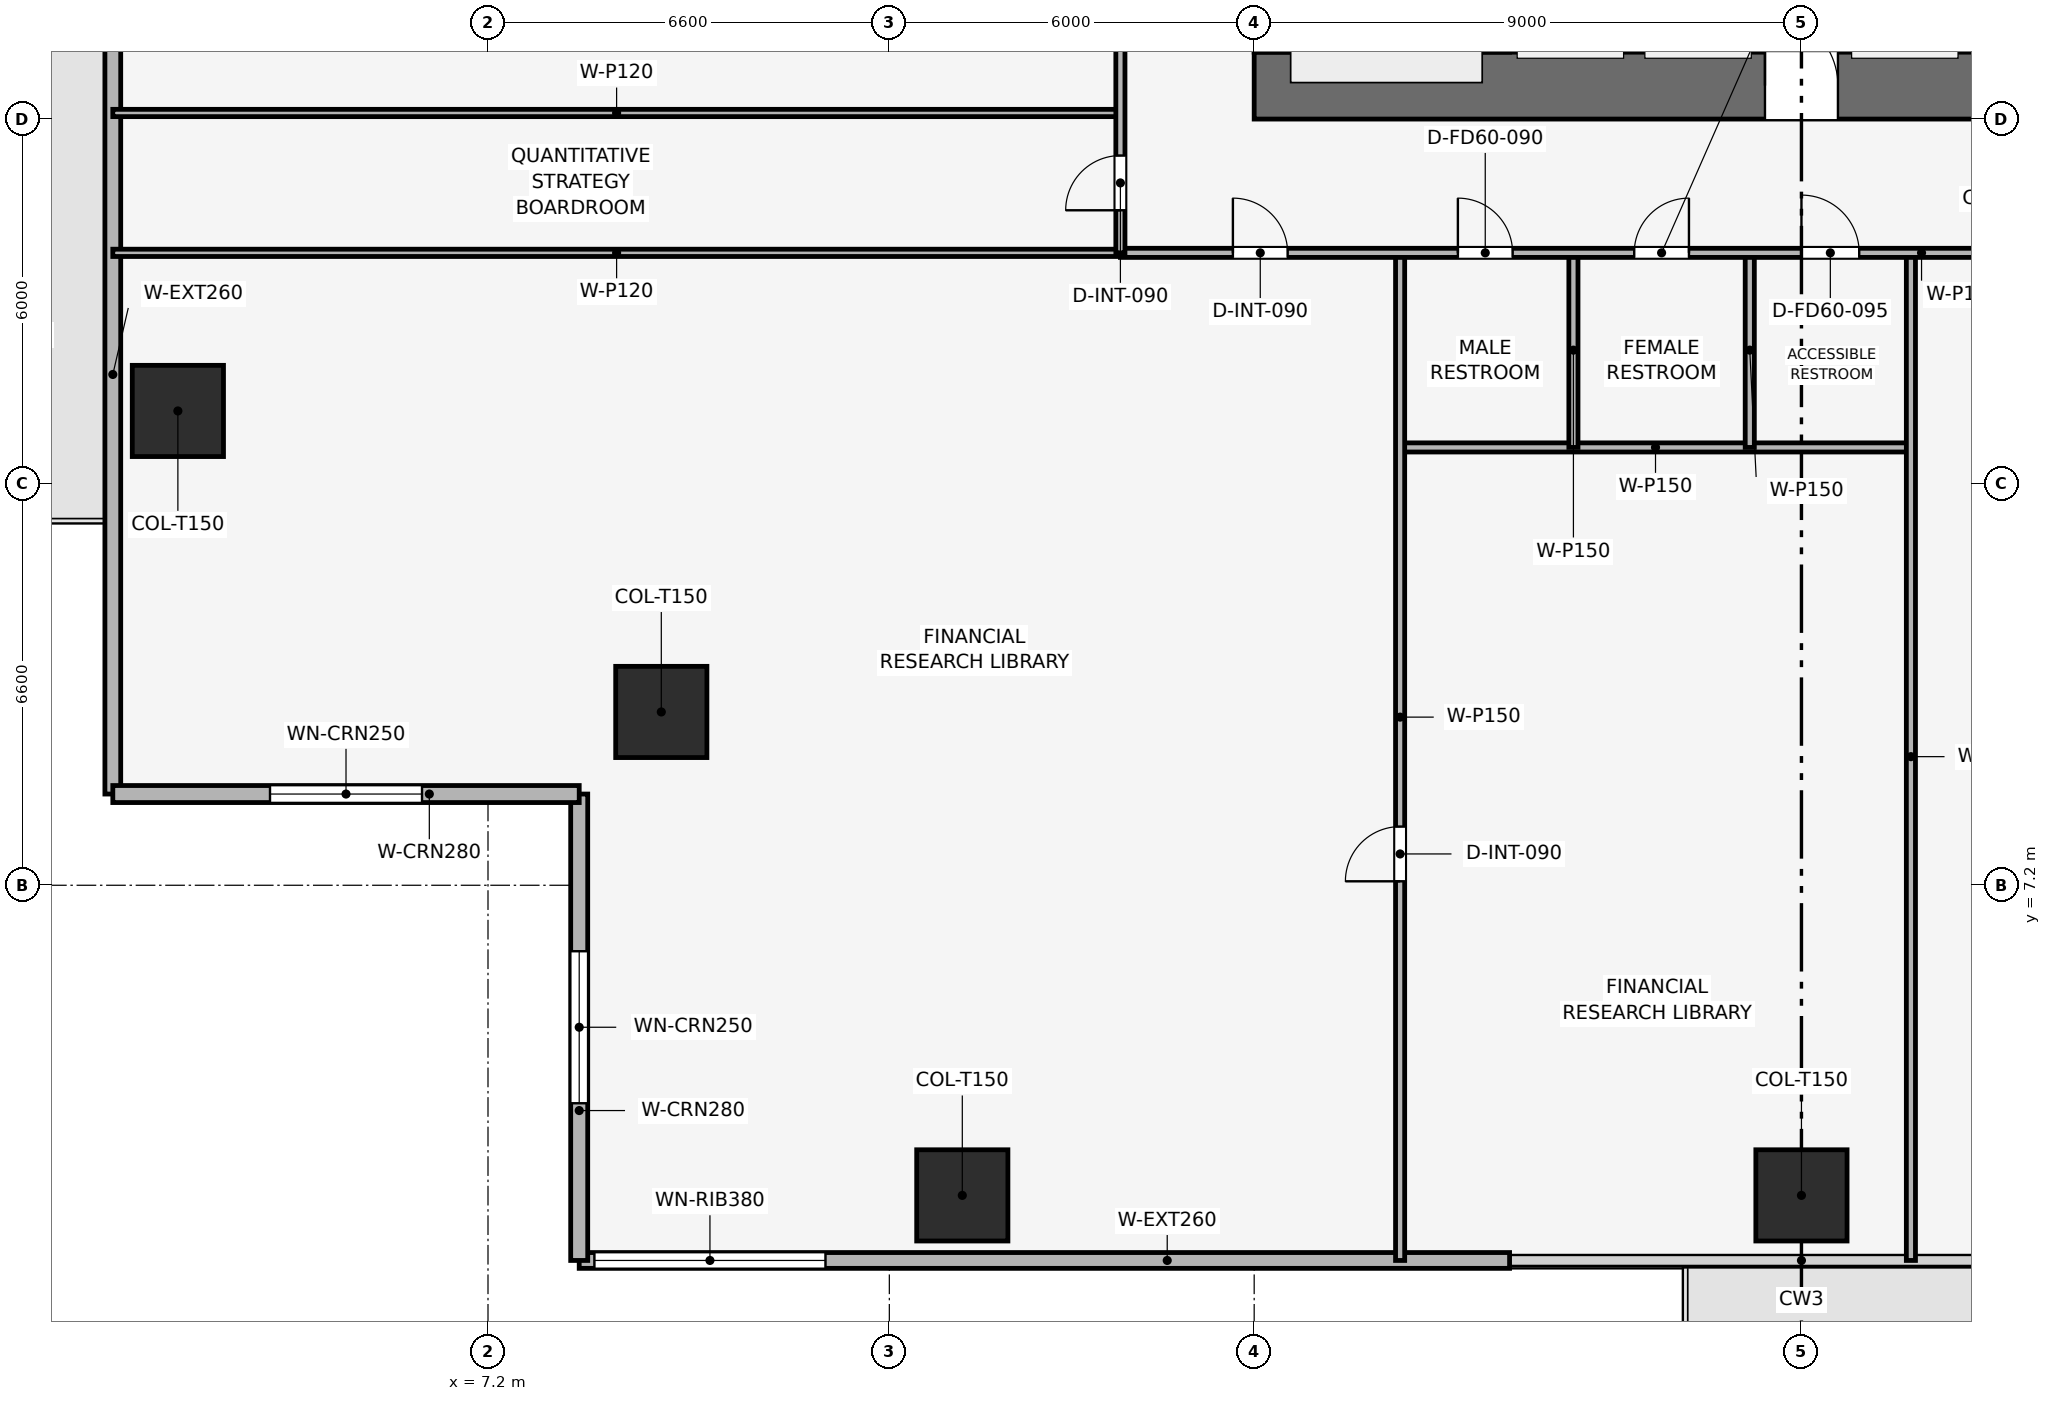
"""IFC4 building model, lengths in metres.
Left out: names, types, materials, properties, quantities, classifications, styles, units other than length and angle.
Written with IfcOpenShell. Run it as: python <this file> out.ifc"""

import sys

from ifc_helpers import new_model, si_unit, direction, frame, frame_2d, origin, origin_2d, place, context, subcontext, project, spatial, rectangle, extrude, element, fill, save


model = new_model("IFC4")
c1 = context("Model", 3, precision=1e-05, world=origin(), true_north=direction((0.0, 1.0)))
c2 = subcontext(c1, "Body", "Model", "MODEL_VIEW")
j1 = project(units=[si_unit("LENGTHUNIT", "METRE"), si_unit("PLANEANGLEUNIT", "RADIAN")], contexts=[c1])
p1 = place(None, origin())
s1 = spatial("IfcSite", under=j1, at=p1, CompositionType="ELEMENT")
p2 = place(p1, origin())
s2 = spatial("IfcBuilding", under=s1, at=p2, CompositionType="ELEMENT")
p3 = place(p2, frame((0.0, 0.0, 37.8)))
s3 = spatial("IfcBuildingStorey", under=s2, at=p3, CompositionType="ELEMENT", Elevation=37.8)
p4 = place(p3, frame((19.8, 20.35, 0.0), z_axis=(0.0, 0.0, 1.0), x_axis=(1.0, 0.0, 0.0)))
e1 = element("IfcWall", 1, at=p4, inside=s3, PredefinedType="SHEAR", context=c2, shape_type="SweptSolid", body=[
    extrude(rectangle(XDim=18.0, YDim=1.1, at=frame_2d((9.0, 0.0))), origin(), (0.0, 0.0, 1.0), 3.9),
])
p5 = place(p4, frame((8.4, 0.0, 0.0)))
e2 = element("IfcOpeningElement", 2, at=p5, cuts=e1, PredefinedType="OPENING", context=c2, shape_type="SweptSolid", body=[
    extrude(rectangle(XDim=1.2, YDim=2.2, at=frame_2d((0.6, 1.1))), frame((0.0, 0.56, 0.0), z_axis=(0.0, -1.0, 0.0), x_axis=(1.0, 0.0, 0.0)), (0.0, 0.0, 1.0), 1.12),
])
p6 = place(p3, frame((20.35, 20.9, 0.0), z_axis=(0.0, 0.0, 1.0), x_axis=(0.0, 1.0, 0.0)))
e3 = element("IfcWall", 3, at=p6, inside=s3, PredefinedType="SHEAR", context=c2, shape_type="SweptSolid", body=[
    extrude(rectangle(XDim=15.8, YDim=1.1, at=frame_2d((7.9, 0.0))), origin(), (0.0, 0.0, 1.0), 3.9),
])
p7 = place(p6, frame((9.9, 0.0, 0.0)))
e4 = element("IfcOpeningElement", 4, at=p7, cuts=e3, PredefinedType="OPENING", context=c2, shape_type="SweptSolid", body=[
    extrude(rectangle(XDim=1.1, YDim=2.15, at=frame_2d((0.55, 1.075))), frame((0.0, 0.56, 0.0), z_axis=(0.0, -1.0, 0.0), x_axis=(1.0, 0.0, 0.0)), (0.0, 0.0, 1.0), 1.12),
])
p8 = place(p3, frame((23.775, 20.9, 0.0), z_axis=(0.0, 0.0, 1.0), x_axis=(0.0, 1.0, 0.0)))
e5 = element("IfcWall", 5, at=p8, inside=s3, PredefinedType="SHEAR", context=c2, shape_type="SweptSolid", body=[
    extrude(rectangle(XDim=15.8, YDim=0.45, at=frame_2d((7.9, 0.0))), origin(), (0.0, 0.0, 1.0), 3.9),
])
for number, where, z_axis, x_axis in (
    (6, (15.0, 2.1, 0.003), (0.0, 0.0, 1.0), (1.0, 0.0, 0.0)),
    (7, (28.8, 2.1, 0.003), (0.0, 0.0, 1.0), (1.0, 0.0, 0.0)),
    (8, (2.1, 15.0, 0.003), (0.0, 0.0, 1.0), (1.0, 0.0, 0.0)),
    (9, (10.05, 10.05, 0.003), (0.0, 0.0, 1.0), (1.0, 0.0, 0.0)),
):
    element("IfcColumn", number, at=place(p3, frame(where, z_axis=z_axis, x_axis=x_axis)), inside=s3, PredefinedType="COLUMN", context=c2, shape_type="SweptSolid", body=[
        extrude(rectangle(XDim=1.5, YDim=1.5, at=origin_2d()), origin(), (0.0, 0.0, 1.0), 3.644),
    ])
p9 = place(p3, frame((24.0, 1.03, 0.0), z_axis=(0.0, 0.0, 1.0), x_axis=(-1.0, 0.0, 0.0)))
e10 = element("IfcWall", 10, at=p9, inside=s3, PredefinedType="SOLIDWALL", context=c2, shape_type="SweptSolid", body=[
    extrude(rectangle(XDim=15.3, YDim=0.26, at=frame_2d((7.65, 0.0))), origin(), (0.0, 0.0, 1.0), 3.65),
])
p10 = place(p9, frame((11.25, 0.0, 0.9)))
e11 = element("IfcOpeningElement", 11, at=p10, cuts=e10, PredefinedType="OPENING", context=c2, shape_type="SweptSolid", body=[
    extrude(rectangle(XDim=3.8, YDim=1.9, at=frame_2d((1.9, 0.95))), frame((0.0, 0.14, 0.0), z_axis=(0.0, -1.0, 0.0), x_axis=(1.0, 0.0, 0.0)), (0.0, 0.0, 1.0), 0.28),
])
p11 = place(p3, frame((1.03, 8.7, 0.0), z_axis=(0.0, 0.0, 1.0), x_axis=(0.0, 1.0, 0.0)))
e12 = element("IfcWall", 12, at=p11, inside=s3, PredefinedType="SOLIDWALL", context=c2, shape_type="SweptSolid", body=[
    extrude(rectangle(XDim=15.3, YDim=0.26, at=frame_2d((7.65, 0.0))), origin(), (0.0, 0.0, 1.0), 3.65),
])
p12 = place(p11, frame((13.95, 0.0, 0.0)))
e13 = element("IfcOpeningElement", 13, at=p12, cuts=e12, PredefinedType="OPENING", context=c2, shape_type="SweptSolid", body=[
    extrude(rectangle(XDim=1.1, YDim=2.2, at=frame_2d((0.55, 1.1))), frame((0.0, 0.14, 0.0), z_axis=(0.0, -1.0, 0.0), x_axis=(1.0, 0.0, 0.0)), (0.0, 0.0, 1.0), 0.28),
])
p13 = place(p3, frame((8.7, 1.03, 0.0), z_axis=(0.0, 0.0, 1.0), x_axis=(0.0, 1.0, 0.0)))
e14 = element("IfcWall", 14, at=p13, inside=s3, PredefinedType="SOLIDWALL", context=c2, shape_type="SweptSolid", body=[
    extrude(rectangle(XDim=7.67, YDim=0.28, at=frame_2d((3.835, 0.0))), origin(), (0.0, 0.0, 1.0), 3.65),
])
p14 = place(p13, frame((2.585, 0.0, 0.9)))
e15 = element("IfcOpeningElement", 15, at=p14, cuts=e14, PredefinedType="OPENING", context=c2, shape_type="SweptSolid", body=[
    extrude(rectangle(XDim=2.5, YDim=1.9, at=frame_2d((1.25, 0.95))), frame((0.0, 0.15, 0.0), z_axis=(0.0, -1.0, 0.0), x_axis=(1.0, 0.0, 0.0)), (0.0, 0.0, 1.0), 0.3),
])
p15 = place(p3, frame((8.7, 8.7, 0.0), z_axis=(0.0, 0.0, 1.0), x_axis=(-1.0, 0.0, 0.0)))
e16 = element("IfcWall", 16, at=p15, inside=s3, PredefinedType="SOLIDWALL", context=c2, shape_type="SweptSolid", body=[
    extrude(rectangle(XDim=7.67, YDim=0.28, at=frame_2d((3.835, 0.0))), origin(), (0.0, 0.0, 1.0), 3.65),
])
p16 = place(p15, frame((2.585, 0.0, 0.9)))
e17 = element("IfcOpeningElement", 17, at=p16, cuts=e16, PredefinedType="OPENING", context=c2, shape_type="SweptSolid", body=[
    extrude(rectangle(XDim=2.5, YDim=1.9, at=frame_2d((1.25, 0.95))), frame((0.0, 0.15, 0.0), z_axis=(0.0, -1.0, 0.0), x_axis=(1.0, 0.0, 0.0)), (0.0, 0.0, 1.0), 0.3),
])
p17 = place(p3, frame((22.2, 14.4, 0.0), z_axis=(0.0, 0.0, 1.0), x_axis=(1.0, 0.0, 0.0)))
e18 = element("IfcWall", 18, at=p17, inside=s3, PredefinedType="PARTITIONING", context=c2, shape_type="SweptSolid", body=[
    extrude(rectangle(XDim=8.4, YDim=0.15, at=frame_2d((4.2, 0.0))), origin(), (0.0, 0.0, 1.0), 3.085),
])
p18 = place(p3, frame((22.2, 1.03, 0.0), z_axis=(0.0, 0.0, 1.0), x_axis=(0.0, 1.0, 0.0)))
e19 = element("IfcWall", 19, at=p18, inside=s3, PredefinedType="PARTITIONING", context=c2, shape_type="SweptSolid", body=[
    extrude(rectangle(XDim=16.57, YDim=0.15, at=frame_2d((8.285, 0.0))), origin(), (0.0, 0.0, 1.0), 2.935),
])
p19 = place(p18, frame((6.235, 0.0, 0.0)))
e20 = element("IfcOpeningElement", 20, at=p19, cuts=e19, PredefinedType="OPENING", context=c2, shape_type="SweptSolid", body=[
    extrude(rectangle(XDim=0.9, YDim=2.1, at=frame_2d((0.45, 1.05))), frame((0.0, 0.085, 0.0), z_axis=(0.0, -1.0, 0.0), x_axis=(1.0, 0.0, 0.0)), (0.0, 0.0, 1.0), 0.17),
])
p20 = place(p3, frame((30.6, 1.03, 0.0), z_axis=(0.0, 0.0, 1.0), x_axis=(0.0, 1.0, 0.0)))
e21 = element("IfcWall", 21, at=p20, inside=s3, PredefinedType="PARTITIONING", context=c2, shape_type="SweptSolid", body=[
    extrude(rectangle(XDim=16.57, YDim=0.15, at=frame_2d((8.285, 0.0))), origin(), (0.0, 0.0, 1.0), 2.935),
])
for number, where, z_axis, x_axis in (
    (22, (25.05, 14.4, 0.0), (0.0, 0.0, 1.0), (0.0, 1.0, 0.0)),
    (23, (27.95, 14.4, 0.0), (0.0, 0.0, 1.0), (0.0, 1.0, 0.0)),
):
    element("IfcWall", number, at=place(p3, frame(where, z_axis=z_axis, x_axis=x_axis)), inside=s3, PredefinedType="PARTITIONING", context=c2, shape_type="SweptSolid", body=[
        extrude(rectangle(XDim=3.2, YDim=0.15, at=frame_2d((1.6, 0.0))), origin(), (0.0, 0.0, 1.0), 3.65),
    ])
for number, where, z_axis, x_axis in (
    (24, (1.03, 17.6, 0.0), (0.0, 0.0, 1.0), (1.0, 0.0, 0.0)),
    (25, (1.03, 19.9, 0.0), (0.0, 0.0, 1.0), (1.0, 0.0, 0.0)),
):
    element("IfcWall", number, at=place(p3, frame(where, z_axis=z_axis, x_axis=x_axis)), inside=s3, PredefinedType="PARTITIONING", context=c2, shape_type="SweptSolid", body=[
        extrude(rectangle(XDim=16.57, YDim=0.12, at=frame_2d((8.285, 0.0))), origin(), (0.0, 0.0, 1.0), 2.935),
    ])
p21 = place(p3, frame((17.6, 17.6, 0.0), z_axis=(0.0, 0.0, 1.0), x_axis=(1.0, 0.0, 0.0)))
e26 = element("IfcWall", 26, at=p21, inside=s3, PredefinedType="PARTITIONING", context=c2, shape_type="SweptSolid", body=[
    extrude(rectangle(XDim=22.4, YDim=0.15, at=frame_2d((11.2, 0.0))), origin(), (0.0, 0.0, 1.0), 3.085),
])
p22 = place(p21, frame((1.85, 0.0, 0.0)))
e27 = element("IfcOpeningElement", 27, at=p22, cuts=e26, PredefinedType="OPENING", context=c2, shape_type="SweptSolid", body=[
    extrude(rectangle(XDim=0.9, YDim=2.1, at=frame_2d((0.45, 1.05))), frame((0.0, 0.085, 0.0), z_axis=(0.0, -1.0, 0.0), x_axis=(1.0, 0.0, 0.0)), (0.0, 0.0, 1.0), 0.17),
])
p23 = place(p21, frame((5.55, 0.0, 0.0)))
e28 = element("IfcOpeningElement", 28, at=p23, cuts=e26, PredefinedType="OPENING", context=c2, shape_type="SweptSolid", body=[
    extrude(rectangle(XDim=0.9, YDim=2.1, at=frame_2d((0.45, 1.05))), frame((0.0, 0.085, 0.0), z_axis=(0.0, -1.0, 0.0), x_axis=(1.0, 0.0, 0.0)), (0.0, 0.0, 1.0), 0.17),
])
p24 = place(p21, frame((8.45, 0.0, 0.0)))
e29 = element("IfcOpeningElement", 29, at=p24, cuts=e26, PredefinedType="OPENING", context=c2, shape_type="SweptSolid", body=[
    extrude(rectangle(XDim=0.9, YDim=2.1, at=frame_2d((0.45, 1.05))), frame((0.0, 0.085, 0.0), z_axis=(0.0, -1.0, 0.0), x_axis=(1.0, 0.0, 0.0)), (0.0, 0.0, 1.0), 0.17),
])
p25 = place(p21, frame((11.2, 0.0, 0.0)))
e30 = element("IfcOpeningElement", 30, at=p25, cuts=e26, PredefinedType="OPENING", context=c2, shape_type="SweptSolid", body=[
    extrude(rectangle(XDim=0.95, YDim=2.1, at=frame_2d((0.475, 1.05))), frame((0.0, 0.085, 0.0), z_axis=(0.0, -1.0, 0.0), x_axis=(1.0, 0.0, 0.0)), (0.0, 0.0, 1.0), 0.17),
])
p26 = place(p21, frame((17.25, 0.0, 0.0)))
e31 = element("IfcOpeningElement", 31, at=p26, cuts=e26, PredefinedType="OPENING", context=c2, shape_type="SweptSolid", body=[
    extrude(rectangle(XDim=0.9, YDim=2.1, at=frame_2d((0.45, 1.05))), frame((0.0, 0.085, 0.0), z_axis=(0.0, -1.0, 0.0), x_axis=(1.0, 0.0, 0.0)), (0.0, 0.0, 1.0), 0.17),
])
p27 = place(p3, frame((17.6, 17.6, 0.0), z_axis=(0.0, 0.0, 1.0), x_axis=(0.0, 1.0, 0.0)))
e32 = element("IfcWall", 32, at=p27, inside=s3, PredefinedType="PARTITIONING", context=c2, shape_type="SweptSolid", body=[
    extrude(rectangle(XDim=22.4, YDim=0.15, at=frame_2d((11.2, 0.0))), origin(), (0.0, 0.0, 1.0), 3.085),
])
p28 = place(p27, frame((0.7, 0.0, 0.0)))
e33 = element("IfcOpeningElement", 33, at=p28, cuts=e32, PredefinedType="OPENING", context=c2, shape_type="SweptSolid", body=[
    extrude(rectangle(XDim=0.9, YDim=2.1, at=frame_2d((0.45, 1.05))), frame((0.0, 0.085, 0.0), z_axis=(0.0, -1.0, 0.0), x_axis=(1.0, 0.0, 0.0)), (0.0, 0.0, 1.0), 0.17),
])
p29 = place(p27, frame((6.365, 0.0, 0.0)))
e34 = element("IfcOpeningElement", 34, at=p29, cuts=e32, PredefinedType="OPENING", context=c2, shape_type="SweptSolid", body=[
    extrude(rectangle(XDim=0.9, YDim=2.1, at=frame_2d((0.45, 1.05))), frame((0.0, 0.085, 0.0), z_axis=(0.0, -1.0, 0.0), x_axis=(1.0, 0.0, 0.0)), (0.0, 0.0, 1.0), 0.17),
])
p30 = place(p27, frame((16.415, 0.0, 0.0)))
e35 = element("IfcOpeningElement", 35, at=p30, cuts=e32, PredefinedType="OPENING", context=c2, shape_type="SweptSolid", body=[
    extrude(rectangle(XDim=0.9, YDim=2.1, at=frame_2d((0.45, 1.05))), frame((0.0, 0.085, 0.0), z_axis=(0.0, -1.0, 0.0), x_axis=(1.0, 0.0, 0.0)), (0.0, 0.0, 1.0), 0.17),
])
p31 = place(p10, origin())
e36 = element("IfcWindow", 36, at=p31, inside=s3, PartitioningType="SINGLE_PANEL", PredefinedType="WINDOW", context=c2, shape_type="SweptSolid", body=[
    extrude(rectangle(XDim=3.8, YDim=1.9, at=frame_2d((1.9, 0.95))), frame((0.0, 0.03, 0.0), z_axis=(0.0, -1.0, 0.0), x_axis=(1.0, 0.0, 0.0)), (0.0, 0.0, 1.0), 0.06),
])
fill(e11, e36)
p32 = place(p14, origin())
e37 = element("IfcWindow", 37, at=p32, inside=s3, PartitioningType="SINGLE_PANEL", PredefinedType="WINDOW", context=c2, shape_type="SweptSolid", body=[
    extrude(rectangle(XDim=2.5, YDim=1.9, at=frame_2d((1.25, 0.95))), frame((0.0, 0.03, 0.0), z_axis=(0.0, -1.0, 0.0), x_axis=(1.0, 0.0, 0.0)), (0.0, 0.0, 1.0), 0.06),
])
fill(e15, e37)
p33 = place(p16, origin())
e38 = element("IfcWindow", 38, at=p33, inside=s3, PartitioningType="SINGLE_PANEL", PredefinedType="WINDOW", context=c2, shape_type="SweptSolid", body=[
    extrude(rectangle(XDim=2.5, YDim=1.9, at=frame_2d((1.25, 0.95))), frame((0.0, 0.03, 0.0), z_axis=(0.0, -1.0, 0.0), x_axis=(1.0, 0.0, 0.0)), (0.0, 0.0, 1.0), 0.06),
])
fill(e17, e38)
p34 = place(p19, origin())
e39 = element("IfcDoor", 39, at=p34, inside=s3, OperationType="SINGLE_SWING_LEFT", PredefinedType="DOOR", context=c2, shape_type="SweptSolid", body=[
    extrude(rectangle(XDim=0.9, YDim=2.1, at=frame_2d((0.45, 1.05))), frame((0.0, 0.025, 0.0), z_axis=(0.0, -1.0, 0.0), x_axis=(1.0, 0.0, 0.0)), (0.0, 0.0, 1.0), 0.05),
])
fill(e20, e39)
p35 = place(p22, origin())
e40 = element("IfcDoor", 40, at=p35, inside=s3, OperationType="SINGLE_SWING_LEFT", PredefinedType="DOOR", context=c2, shape_type="SweptSolid", body=[
    extrude(rectangle(XDim=0.9, YDim=2.1, at=frame_2d((0.45, 1.05))), frame((0.0, 0.025, 0.0), z_axis=(0.0, -1.0, 0.0), x_axis=(1.0, 0.0, 0.0)), (0.0, 0.0, 1.0), 0.05),
])
fill(e27, e40)
p36 = place(p23, origin())
e41 = element("IfcDoor", 41, at=p36, inside=s3, OperationType="SINGLE_SWING_LEFT", PredefinedType="DOOR", context=c2, shape_type="SweptSolid", body=[
    extrude(rectangle(XDim=0.9, YDim=2.1, at=frame_2d((0.45, 1.05))), frame((0.0, 0.025, 0.0), z_axis=(0.0, -1.0, 0.0), x_axis=(1.0, 0.0, 0.0)), (0.0, 0.0, 1.0), 0.05),
])
fill(e28, e41)
p37 = place(p24, origin())
e42 = element("IfcDoor", 42, at=p37, inside=s3, OperationType="SINGLE_SWING_RIGHT", PredefinedType="DOOR", context=c2, shape_type="SweptSolid", body=[
    extrude(rectangle(XDim=0.9, YDim=2.1, at=frame_2d((0.45, 1.05))), frame((0.0, 0.025, 0.0), z_axis=(0.0, -1.0, 0.0), x_axis=(1.0, 0.0, 0.0)), (0.0, 0.0, 1.0), 0.05),
])
fill(e29, e42)
p38 = place(p25, origin())
e43 = element("IfcDoor", 43, at=p38, inside=s3, OperationType="SINGLE_SWING_LEFT", PredefinedType="DOOR", context=c2, shape_type="SweptSolid", body=[
    extrude(rectangle(XDim=0.95, YDim=2.1, at=frame_2d((0.475, 1.05))), frame((0.0, 0.025, 0.0), z_axis=(0.0, -1.0, 0.0), x_axis=(1.0, 0.0, 0.0)), (0.0, 0.0, 1.0), 0.05),
])
fill(e30, e43)
p39 = place(p28, origin())
e44 = element("IfcDoor", 44, at=p39, inside=s3, OperationType="SINGLE_SWING_LEFT", PredefinedType="DOOR", context=c2, shape_type="SweptSolid", body=[
    extrude(rectangle(XDim=0.9, YDim=2.1, at=frame_2d((0.45, 1.05))), frame((0.0, 0.025, 0.0), z_axis=(0.0, -1.0, 0.0), x_axis=(1.0, 0.0, 0.0)), (0.0, 0.0, 1.0), 0.05),
])
fill(e33, e44)
p40 = place(p5, origin())
e45 = element("IfcDoor", 45, at=p40, inside=s3, OperationType="SINGLE_SWING_LEFT", PredefinedType="DOOR", context=c2, shape_type="SweptSolid", body=[
    extrude(rectangle(XDim=1.2, YDim=2.2, at=frame_2d((0.6, 1.1))), frame((0.0, 0.025, 0.0), z_axis=(0.0, -1.0, 0.0), x_axis=(1.0, 0.0, 0.0)), (0.0, 0.0, 1.0), 0.05),
])
fill(e2, e45)
save(model, sys.argv[1])
